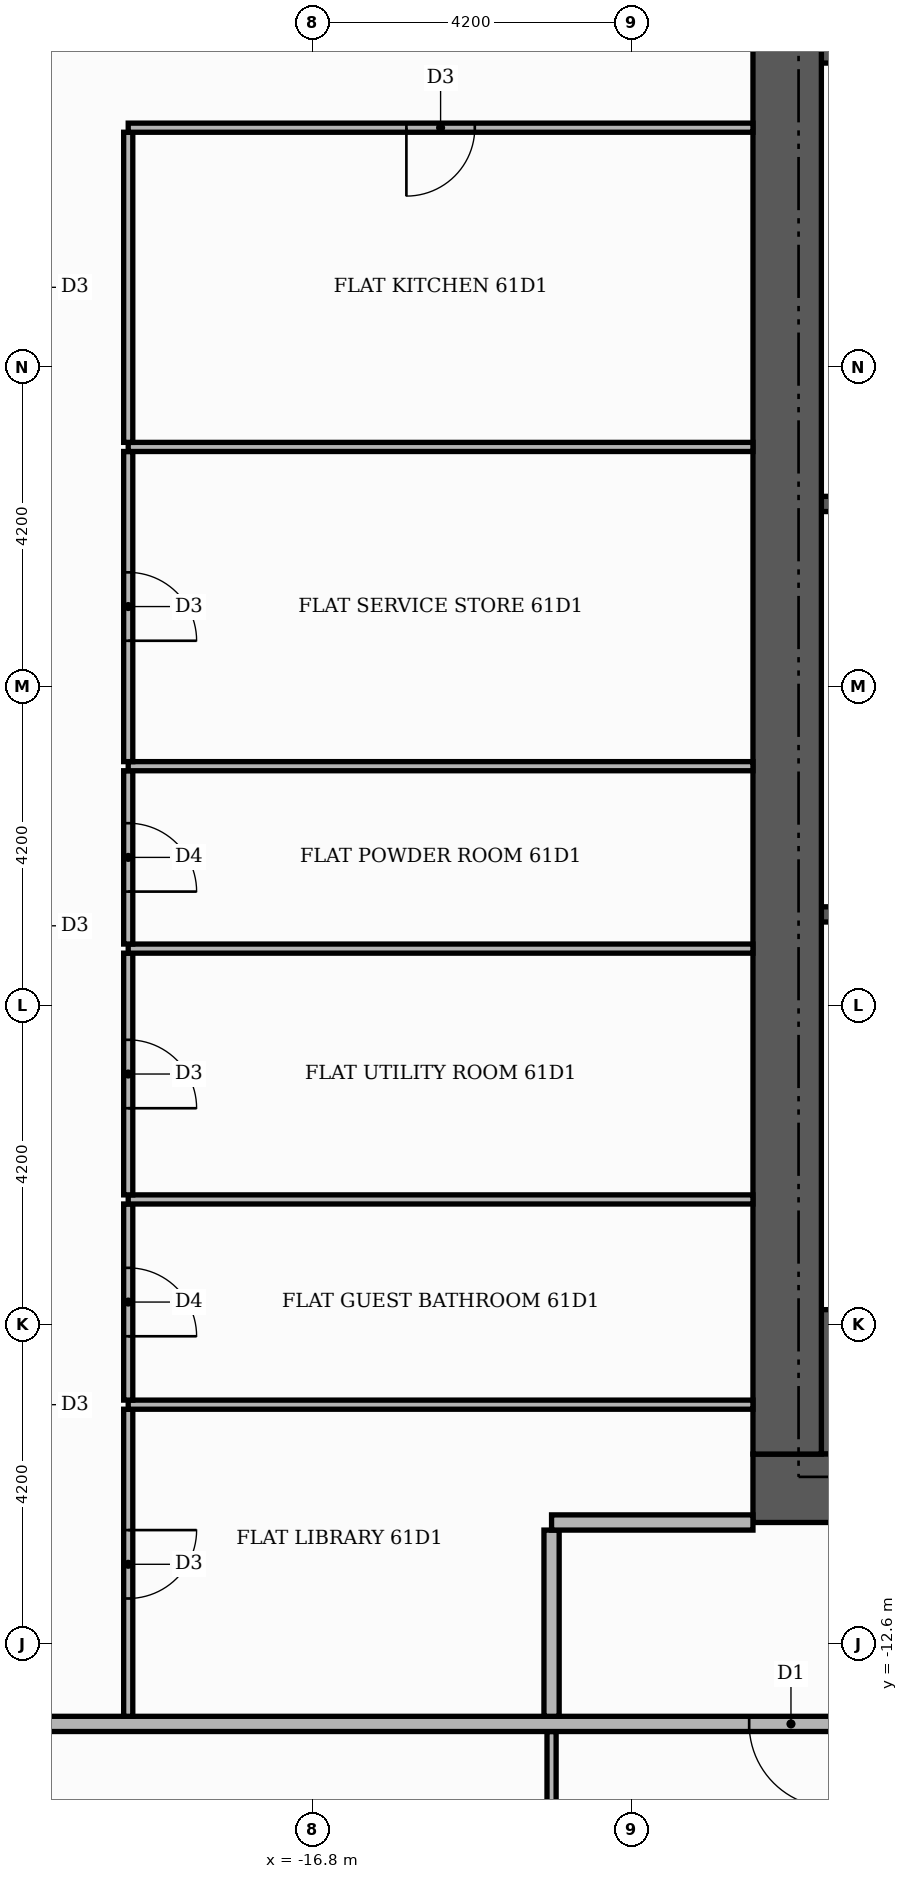
"""IFC4 building model, lengths in metres.
Left out: names, types, materials, properties, quantities, classifications, styles, units other than length and angle.
Written with IfcOpenShell. Run it as: python <this file> out.ifc"""

import sys

from ifc_helpers import new_model, si_unit, direction, frame, frame_2d, origin, place, context, subcontext, project, spatial, rectangle, extrude, element, fill, save


model = new_model("IFC4")
c1 = context("Model", 3, precision=1e-05, world=origin(), true_north=direction((0.0, 1.0)))
c2 = subcontext(c1, "Body", "Model", "MODEL_VIEW")
j1 = project(units=[si_unit("LENGTHUNIT", "METRE"), si_unit("PLANEANGLEUNIT", "RADIAN")], contexts=[c1])
p1 = place(None, origin())
s1 = spatial("IfcSite", under=j1, at=p1, CompositionType="ELEMENT")
p2 = place(p1, origin())
s2 = spatial("IfcBuilding", under=s1, at=p2, CompositionType="ELEMENT")
p3 = place(p2, frame((0.0, 0.0, 256.2)))
s3 = spatial("IfcBuildingStorey", under=s2, at=p3, CompositionType="ELEMENT", Elevation=256.2)
for number, where, z_axis, x_axis in (
    (1, (-10.1, -9.15, 0.0), (0.0, 0.0, 1.0), (1.0, 0.0, 0.0)),
    (2, (-10.1, 9.15, 0.0), (0.0, 0.0, 1.0), (1.0, 0.0, 0.0)),
):
    element("IfcWall", number, at=place(p3, frame(where, z_axis=z_axis, x_axis=x_axis)), inside=s3, PredefinedType="SHEAR", context=c2, shape_type="SweptSolid", body=[
        extrude(rectangle(XDim=4.6, YDim=1.9, at=frame_2d((2.3, 0.0))), origin(), (0.0, 0.0, 1.0), 3.48),
    ])
for number, where, z_axis, x_axis in (
    (3, (-10.1, -3.0, 0.0), (0.0, 0.0, 1.0), (1.0, 0.0, 0.0)),
    (4, (-10.1, 2.4, 0.0), (0.0, 0.0, 1.0), (1.0, 0.0, 0.0)),
):
    element("IfcWall", number, at=place(p3, frame(where, z_axis=z_axis, x_axis=x_axis)), inside=s3, PredefinedType="SHEAR", context=c2, shape_type="SweptSolid", body=[
        extrude(rectangle(XDim=0.9, YDim=0.2, at=frame_2d((0.45, 0.0))), origin(), (0.0, 0.0, 1.0), 3.48),
    ])
p4 = place(p3, frame((-11.0, -10.55, 0.0), z_axis=(0.0, 0.0, 1.0), x_axis=(1.0, 0.0, 0.0)))
e5 = element("IfcWall", 5, at=p4, inside=s3, PredefinedType="SHEAR", context=c2, shape_type="SweptSolid", body=[
    extrude(rectangle(XDim=22.0, YDim=0.9, at=frame_2d((11.0, 0.0))), origin(), (0.0, 0.0, 1.0), 3.48),
])
p5 = place(p4, frame((7.4, 0.0, 0.0)))
e6 = element("IfcOpeningElement", 6, at=p5, cuts=e5, PredefinedType="OPENING", context=c2, shape_type="SweptSolid", body=[
    extrude(rectangle(XDim=1.8, YDim=2.2, at=frame_2d((0.9, 1.1))), frame((0.0, 0.46, 0.0), z_axis=(0.0, -1.0, 0.0), x_axis=(1.0, 0.0, 0.0)), (0.0, 0.0, 1.0), 0.92),
])
p6 = place(p3, frame((-10.55, -10.1, 0.0), z_axis=(0.0, 0.0, 1.0), x_axis=(0.0, 1.0, 0.0)))
e7 = element("IfcWall", 7, at=p6, inside=s3, PredefinedType="SHEAR", context=c2, shape_type="SweptSolid", body=[
    extrude(rectangle(XDim=20.2, YDim=0.9, at=frame_2d((10.1, 0.0))), origin(), (0.0, 0.0, 1.0), 3.48),
])
p7 = place(p3, frame((-13.65, -20.66, 0.0), z_axis=(0.0, 0.0, 1.0), x_axis=(0.0, 1.0, 0.0)))
e8 = element("IfcWall", 8, at=p7, inside=s3, PredefinedType="PARTITIONING", context=c2, shape_type="SweptSolid", body=[
    extrude(rectangle(XDim=6.91, YDim=0.12, at=frame_2d((3.455, 0.0))), origin(), (0.0, 0.0, 1.0), 3.48),
])
p8 = place(p7, frame((3.025, 0.0, 0.0)))
e9 = element("IfcOpeningElement", 9, at=p8, cuts=e8, PredefinedType="OPENING", context=c2, shape_type="SweptSolid", body=[
    extrude(rectangle(XDim=0.9, YDim=2.1, at=frame_2d((0.45, 1.05))), frame((0.0, 0.07, 0.0), z_axis=(0.0, -1.0, 0.0), x_axis=(1.0, 0.0, 0.0)), (0.0, 0.0, 1.0), 0.14),
])
p9 = place(p3, frame((-25.42, -13.65, 0.0), z_axis=(0.0, 0.0, 1.0), x_axis=(1.0, 0.0, 0.0)))
e10 = element("IfcWall", 10, at=p9, inside=s3, PredefinedType="PARTITIONING", context=c2, shape_type="SweptSolid", body=[
    extrude(rectangle(XDim=39.07, YDim=0.2, at=frame_2d((19.535, 0.0))), origin(), (0.0, 0.0, 1.0), 3.48),
])
p10 = place(p9, frame((14.37, 0.0, 0.0)))
e11 = element("IfcOpeningElement", 11, at=p10, cuts=e10, PredefinedType="OPENING", context=c2, shape_type="SweptSolid", body=[
    extrude(rectangle(XDim=1.1, YDim=2.4, at=frame_2d((0.55, 1.2))), frame((0.0, 0.11, 0.0), z_axis=(0.0, -1.0, 0.0), x_axis=(1.0, 0.0, 0.0)), (0.0, 0.0, 1.0), 0.22),
])
p11 = place(p3, frame((-19.22, -13.55, 0.0), z_axis=(0.0, 0.0, 1.0), x_axis=(0.0, 1.0, 0.0)))
e12 = element("IfcWall", 12, at=p11, inside=s3, PredefinedType="PARTITIONING", context=c2, shape_type="SweptSolid", body=[
    extrude(rectangle(XDim=4.04, YDim=0.12, at=frame_2d((2.02, 0.0))), origin(), (0.0, 0.0, 1.0), 3.48),
])
p12 = place(p11, frame((1.55, 0.0, 0.0)))
e13 = element("IfcOpeningElement", 13, at=p12, cuts=e12, PredefinedType="OPENING", context=c2, shape_type="SweptSolid", body=[
    extrude(rectangle(XDim=0.9, YDim=2.1, at=frame_2d((0.45, 1.05))), frame((0.0, 0.07, 0.0), z_axis=(0.0, -1.0, 0.0), x_axis=(1.0, 0.0, 0.0)), (0.0, 0.0, 1.0), 0.14),
])
p13 = place(p3, frame((-13.65, -13.55, 0.0), z_axis=(0.0, 0.0, 1.0), x_axis=(0.0, 1.0, 0.0)))
e14 = element("IfcWall", 14, at=p13, inside=s3, PredefinedType="PARTITIONING", context=c2, shape_type="SweptSolid", body=[
    extrude(rectangle(XDim=2.45, YDim=0.2, at=frame_2d((1.225, 0.0))), origin(), (0.0, 0.0, 1.0), 3.48),
])
p14 = place(p3, frame((-13.65, -11.0, 0.0), z_axis=(0.0, 0.0, 1.0), x_axis=(1.0, 0.0, 0.0)))
e15 = element("IfcWall", 15, at=p14, inside=s3, PredefinedType="PARTITIONING", context=c2, shape_type="SweptSolid", body=[
    extrude(rectangle(XDim=2.65, YDim=0.2, at=frame_2d((1.325, 0.0))), origin(), (0.0, 0.0, 1.0), 3.48),
])
p15 = place(p3, frame((-19.22, -9.45, 0.0), z_axis=(0.0, 0.0, 1.0), x_axis=(1.0, 0.0, 0.0)))
e16 = element("IfcWall", 16, at=p15, inside=s3, PredefinedType="PARTITIONING", context=c2, shape_type="SweptSolid", body=[
    extrude(rectangle(XDim=8.22, YDim=0.12, at=frame_2d((4.11, 0.0))), origin(), (0.0, 0.0, 1.0), 3.48),
])
p16 = place(p3, frame((-19.22, -9.39, 0.0), z_axis=(0.0, 0.0, 1.0), x_axis=(0.0, 1.0, 0.0)))
e17 = element("IfcWall", 17, at=p16, inside=s3, PredefinedType="PARTITIONING", context=c2, shape_type="SweptSolid", body=[
    extrude(rectangle(XDim=2.58, YDim=0.12, at=frame_2d((1.29, 0.0))), origin(), (0.0, 0.0, 1.0), 3.48),
])
p17 = place(p16, frame((0.84, 0.0, 0.0)))
e18 = element("IfcOpeningElement", 18, at=p17, cuts=e17, PredefinedType="OPENING", context=c2, shape_type="SweptSolid", body=[
    extrude(rectangle(XDim=0.9, YDim=2.1, at=frame_2d((0.45, 1.05))), frame((0.0, 0.07, 0.0), z_axis=(0.0, -1.0, 0.0), x_axis=(1.0, 0.0, 0.0)), (0.0, 0.0, 1.0), 0.14),
])
p18 = place(p3, frame((-19.22, -6.75, 0.0), z_axis=(0.0, 0.0, 1.0), x_axis=(1.0, 0.0, 0.0)))
e19 = element("IfcWall", 19, at=p18, inside=s3, PredefinedType="PARTITIONING", context=c2, shape_type="SweptSolid", body=[
    extrude(rectangle(XDim=8.22, YDim=0.12, at=frame_2d((4.11, 0.0))), origin(), (0.0, 0.0, 1.0), 3.48),
])
p19 = place(p3, frame((-19.22, -6.69, 0.0), z_axis=(0.0, 0.0, 1.0), x_axis=(0.0, 1.0, 0.0)))
e20 = element("IfcWall", 20, at=p19, inside=s3, PredefinedType="PARTITIONING", context=c2, shape_type="SweptSolid", body=[
    extrude(rectangle(XDim=3.18, YDim=0.12, at=frame_2d((1.59, 0.0))), origin(), (0.0, 0.0, 1.0), 3.48),
])
p20 = place(p19, frame((1.14, 0.0, 0.0)))
e21 = element("IfcOpeningElement", 21, at=p20, cuts=e20, PredefinedType="OPENING", context=c2, shape_type="SweptSolid", body=[
    extrude(rectangle(XDim=0.9, YDim=2.1, at=frame_2d((0.45, 1.05))), frame((0.0, 0.07, 0.0), z_axis=(0.0, -1.0, 0.0), x_axis=(1.0, 0.0, 0.0)), (0.0, 0.0, 1.0), 0.14),
])
p21 = place(p3, frame((-19.22, -3.45, 0.0), z_axis=(0.0, 0.0, 1.0), x_axis=(1.0, 0.0, 0.0)))
e22 = element("IfcWall", 22, at=p21, inside=s3, PredefinedType="PARTITIONING", context=c2, shape_type="SweptSolid", body=[
    extrude(rectangle(XDim=8.22, YDim=0.12, at=frame_2d((4.11, 0.0))), origin(), (0.0, 0.0, 1.0), 3.48),
])
p22 = place(p3, frame((-19.22, -3.39, 0.0), z_axis=(0.0, 0.0, 1.0), x_axis=(0.0, 1.0, 0.0)))
e23 = element("IfcWall", 23, at=p22, inside=s3, PredefinedType="PARTITIONING", context=c2, shape_type="SweptSolid", body=[
    extrude(rectangle(XDim=2.28, YDim=0.12, at=frame_2d((1.14, 0.0))), origin(), (0.0, 0.0, 1.0), 3.48),
])
p23 = place(p22, frame((0.69, 0.0, 0.0)))
e24 = element("IfcOpeningElement", 24, at=p23, cuts=e23, PredefinedType="OPENING", context=c2, shape_type="SweptSolid", body=[
    extrude(rectangle(XDim=0.9, YDim=2.1, at=frame_2d((0.45, 1.05))), frame((0.0, 0.07, 0.0), z_axis=(0.0, -1.0, 0.0), x_axis=(1.0, 0.0, 0.0)), (0.0, 0.0, 1.0), 0.14),
])
p24 = place(p3, frame((-19.22, -1.05, 0.0), z_axis=(0.0, 0.0, 1.0), x_axis=(1.0, 0.0, 0.0)))
e25 = element("IfcWall", 25, at=p24, inside=s3, PredefinedType="PARTITIONING", context=c2, shape_type="SweptSolid", body=[
    extrude(rectangle(XDim=8.22, YDim=0.12, at=frame_2d((4.11, 0.0))), origin(), (0.0, 0.0, 1.0), 3.48),
])
p25 = place(p3, frame((-19.22, -0.99, 0.0), z_axis=(0.0, 0.0, 1.0), x_axis=(0.0, 1.0, 0.0)))
e26 = element("IfcWall", 26, at=p25, inside=s3, PredefinedType="PARTITIONING", context=c2, shape_type="SweptSolid", body=[
    extrude(rectangle(XDim=4.08, YDim=0.12, at=frame_2d((2.04, 0.0))), origin(), (0.0, 0.0, 1.0), 3.48),
])
p26 = place(p25, frame((1.59, 0.0, 0.0)))
e27 = element("IfcOpeningElement", 27, at=p26, cuts=e26, PredefinedType="OPENING", context=c2, shape_type="SweptSolid", body=[
    extrude(rectangle(XDim=0.9, YDim=2.1, at=frame_2d((0.45, 1.05))), frame((0.0, 0.07, 0.0), z_axis=(0.0, -1.0, 0.0), x_axis=(1.0, 0.0, 0.0)), (0.0, 0.0, 1.0), 0.14),
])
p27 = place(p3, frame((-19.22, 3.15, 0.0), z_axis=(0.0, 0.0, 1.0), x_axis=(1.0, 0.0, 0.0)))
e28 = element("IfcWall", 28, at=p27, inside=s3, PredefinedType="PARTITIONING", context=c2, shape_type="SweptSolid", body=[
    extrude(rectangle(XDim=8.22, YDim=0.12, at=frame_2d((4.11, 0.0))), origin(), (0.0, 0.0, 1.0), 3.48),
])
p28 = place(p3, frame((-19.22, 3.21, 0.0), z_axis=(0.0, 0.0, 1.0), x_axis=(0.0, 1.0, 0.0)))
e29 = element("IfcWall", 29, at=p28, inside=s3, PredefinedType="PARTITIONING", context=c2, shape_type="SweptSolid", body=[
    extrude(rectangle(XDim=4.08, YDim=0.12, at=frame_2d((2.04, 0.0))), origin(), (0.0, 0.0, 1.0), 3.48),
])
p29 = place(p3, frame((-19.22, 7.35, 0.0), z_axis=(0.0, 0.0, 1.0), x_axis=(1.0, 0.0, 0.0)))
e30 = element("IfcWall", 30, at=p29, inside=s3, PredefinedType="PARTITIONING", context=c2, shape_type="SweptSolid", body=[
    extrude(rectangle(XDim=8.22, YDim=0.12, at=frame_2d((4.11, 0.0))), origin(), (0.0, 0.0, 1.0), 3.48),
])
p30 = place(p29, frame((3.66, 0.0, 0.0)))
e31 = element("IfcOpeningElement", 31, at=p30, cuts=e30, PredefinedType="OPENING", context=c2, shape_type="SweptSolid", body=[
    extrude(rectangle(XDim=0.9, YDim=2.1, at=frame_2d((0.45, 1.05))), frame((0.0, 0.07, 0.0), z_axis=(0.0, -1.0, 0.0), x_axis=(1.0, 0.0, 0.0)), (0.0, 0.0, 1.0), 0.14),
])
p31 = place(p10, frame((1.1, 0.0, 0.0), z_axis=(0.0, 0.0, 1.0), x_axis=(-1.0, 0.0, 0.0)))
e32 = element("IfcDoor", 32, at=p31, inside=s3, OperationType="SINGLE_SWING_RIGHT", PredefinedType="DOOR", context=c2, shape_type="SweptSolid", body=[
    extrude(rectangle(XDim=1.1, YDim=2.4, at=frame_2d((0.55, 1.2))), frame((0.0, 0.025, 0.0), z_axis=(0.0, -1.0, 0.0), x_axis=(1.0, 0.0, 0.0)), (0.0, 0.0, 1.0), 0.05),
])
fill(e11, e32)
p32 = place(p30, frame((0.9, 0.0, 0.0), z_axis=(0.0, 0.0, 1.0), x_axis=(-1.0, 0.0, 0.0)))
e33 = element("IfcDoor", 33, at=p32, inside=s3, OperationType="SINGLE_SWING_LEFT", PredefinedType="DOOR", context=c2, shape_type="SweptSolid", body=[
    extrude(rectangle(XDim=0.9, YDim=2.1, at=frame_2d((0.45, 1.05))), frame((0.0, 0.025, 0.0), z_axis=(0.0, -1.0, 0.0), x_axis=(1.0, 0.0, 0.0)), (0.0, 0.0, 1.0), 0.05),
])
fill(e31, e33)
p33 = place(p26, frame((0.9, 0.0, 0.0), z_axis=(0.0, 0.0, 1.0), x_axis=(-1.0, 0.0, 0.0)))
e34 = element("IfcDoor", 34, at=p33, inside=s3, OperationType="SINGLE_SWING_LEFT", PredefinedType="DOOR", context=c2, shape_type="SweptSolid", body=[
    extrude(rectangle(XDim=0.9, YDim=2.1, at=frame_2d((0.45, 1.05))), frame((0.0, 0.025, 0.0), z_axis=(0.0, -1.0, 0.0), x_axis=(1.0, 0.0, 0.0)), (0.0, 0.0, 1.0), 0.05),
])
fill(e27, e34)
p34 = place(p23, frame((0.9, 0.0, 0.0), z_axis=(0.0, 0.0, 1.0), x_axis=(-1.0, 0.0, 0.0)))
e35 = element("IfcDoor", 35, at=p34, inside=s3, OperationType="SINGLE_SWING_LEFT", PredefinedType="DOOR", context=c2, shape_type="SweptSolid", body=[
    extrude(rectangle(XDim=0.9, YDim=2.1, at=frame_2d((0.45, 1.05))), frame((0.0, 0.025, 0.0), z_axis=(0.0, -1.0, 0.0), x_axis=(1.0, 0.0, 0.0)), (0.0, 0.0, 1.0), 0.05),
])
fill(e24, e35)
p35 = place(p20, frame((0.9, 0.0, 0.0), z_axis=(0.0, 0.0, 1.0), x_axis=(-1.0, 0.0, 0.0)))
e36 = element("IfcDoor", 36, at=p35, inside=s3, OperationType="SINGLE_SWING_LEFT", PredefinedType="DOOR", context=c2, shape_type="SweptSolid", body=[
    extrude(rectangle(XDim=0.9, YDim=2.1, at=frame_2d((0.45, 1.05))), frame((0.0, 0.025, 0.0), z_axis=(0.0, -1.0, 0.0), x_axis=(1.0, 0.0, 0.0)), (0.0, 0.0, 1.0), 0.05),
])
fill(e21, e36)
p36 = place(p17, frame((0.9, 0.0, 0.0), z_axis=(0.0, 0.0, 1.0), x_axis=(-1.0, 0.0, 0.0)))
e37 = element("IfcDoor", 37, at=p36, inside=s3, OperationType="SINGLE_SWING_LEFT", PredefinedType="DOOR", context=c2, shape_type="SweptSolid", body=[
    extrude(rectangle(XDim=0.9, YDim=2.1, at=frame_2d((0.45, 1.05))), frame((0.0, 0.025, 0.0), z_axis=(0.0, -1.0, 0.0), x_axis=(1.0, 0.0, 0.0)), (0.0, 0.0, 1.0), 0.05),
])
fill(e18, e37)
p37 = place(p12, frame((0.9, 0.0, 0.0), z_axis=(0.0, 0.0, 1.0), x_axis=(-1.0, 0.0, 0.0)))
e38 = element("IfcDoor", 38, at=p37, inside=s3, OperationType="SINGLE_SWING_RIGHT", PredefinedType="DOOR", context=c2, shape_type="SweptSolid", body=[
    extrude(rectangle(XDim=0.9, YDim=2.1, at=frame_2d((0.45, 1.05))), frame((0.0, 0.025, 0.0), z_axis=(0.0, -1.0, 0.0), x_axis=(1.0, 0.0, 0.0)), (0.0, 0.0, 1.0), 0.05),
])
fill(e13, e38)
save(model, sys.argv[1])
